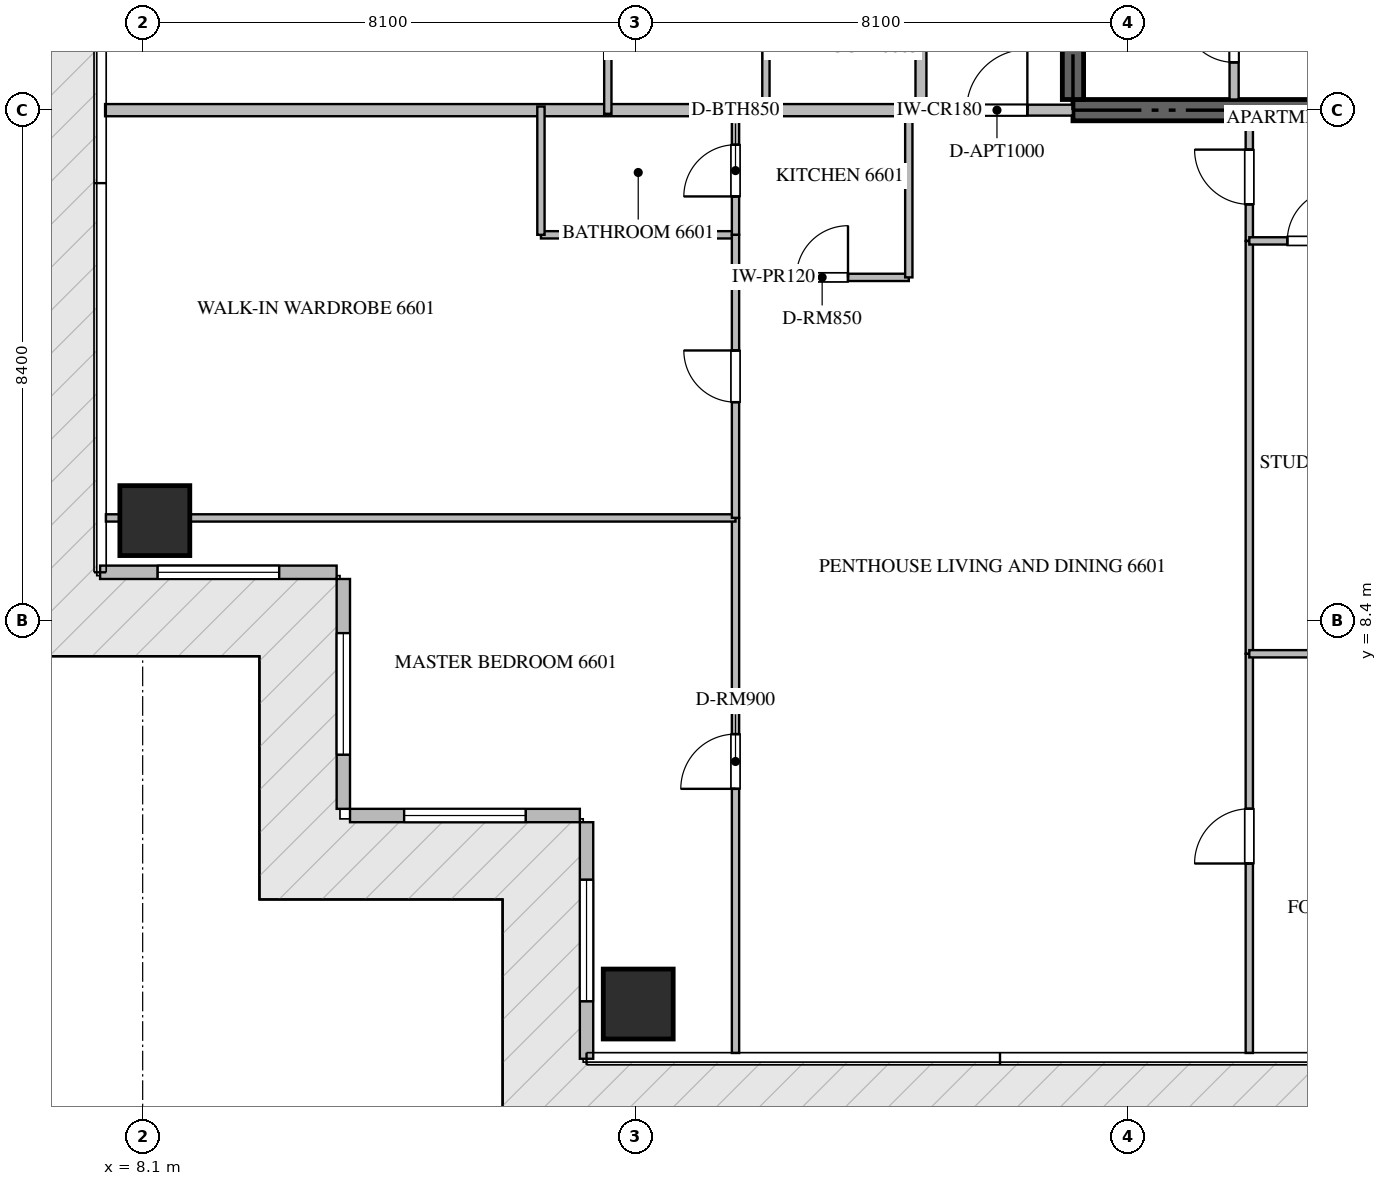
"""IFC4 building model, lengths in metres.
Left out: names, types, materials, properties, quantities, classifications, styles, units other than length and angle.
Written with IfcOpenShell. Run it as: python <this file> out.ifc"""

import sys

from ifc_helpers import new_model, si_unit, direction, frame, frame_2d, origin, origin_2d, place, context, subcontext, project, spatial, rectangle, extrude, source, transform, mapped, element, fill, save


model = new_model("IFC4")
c1 = context("Model", 3, precision=1e-05, world=origin(), true_north=direction((0.0, 1.0)))
c2 = subcontext(c1, "Body", "Model", "MODEL_VIEW")
j1 = project(units=[si_unit("LENGTHUNIT", "METRE"), si_unit("PLANEANGLEUNIT", "RADIAN")], contexts=[c1])
p1 = place(None, origin())
s1 = spatial("IfcSite", under=j1, at=p1, CompositionType="ELEMENT")
p2 = place(p1, origin())
s2 = spatial("IfcBuilding", under=s1, at=p2, CompositionType="ELEMENT")
p3 = place(p2, frame((0.0, 0.0, 264.35)))
s3 = spatial("IfcBuildingStorey", under=s2, at=p3, CompositionType="ELEMENT", Elevation=264.35)
p4 = place(p3, frame((23.4, 16.8, -0.26), z_axis=(0.0, 0.0, 1.0), x_axis=(1.0, 0.0, 0.0)))
e1 = element("IfcWall", 1, at=p4, inside=s3, PredefinedType="SHEAR", context=c2, shape_type="SweptSolid", body=[
    extrude(rectangle(XDim=18.0, YDim=0.35, at=frame_2d((9.0, 0.0))), origin(), (0.0, 0.0, 1.0), 3.848),
])
p5 = place(p3, frame((23.4, 16.975, -0.26), z_axis=(0.0, 0.0, 1.0), x_axis=(0.0, 1.0, 0.0)))
e2 = element("IfcWall", 2, at=p5, inside=s3, PredefinedType="SHEAR", context=c2, shape_type="SweptSolid", body=[
    extrude(rectangle(XDim=4.875, YDim=0.35, at=frame_2d((2.438, 0.0))), origin(), (0.0, 0.0, 1.0), 3.848),
])
m1 = source(origin(), c2, "Body", "SweptSolid", [
    extrude(rectangle(XDim=1.15, YDim=1.15, at=origin_2d()), origin(), (0.0, 0.0, 1.0), 3.85),
])
for number, where, z_axis, x_axis in (
    (3, (16.25, 2.1, -0.26), (0.0, 0.0, 1.0), (1.0, 0.0, 0.0)),
    (4, (8.3, 10.05, -0.26), (0.0, 0.0, 1.0), (1.0, 0.0, 0.0)),
):
    element("IfcColumn", number, at=place(p3, frame(where, z_axis=z_axis, x_axis=x_axis)), inside=s3, PredefinedType="COLUMN", context=c2, shape_type="MappedRepresentation", body=[
        mapped(m1, transform((0.0, 0.0, 0.0), scale=1.0)),
    ])
p6 = place(p3, frame((7.4, 9.2, 0.0), z_axis=(0.0, 0.0, 1.0), x_axis=(1.0, 0.0, 0.0)))
e5 = element("IfcWall", 5, at=p6, inside=s3, PredefinedType="ELEMENTEDWALL", context=c2, shape_type="SweptSolid", body=[
    extrude(rectangle(XDim=3.89, YDim=0.22, at=frame_2d((1.945, 0.0))), origin(), (0.0, 0.0, 1.0), 3.575),
])
p7 = place(p6, frame((0.945, 0.0, 0.65)))
e6 = element("IfcOpeningElement", 6, at=p7, cuts=e5, PredefinedType="OPENING", context=c2, shape_type="SweptSolid", body=[
    extrude(rectangle(XDim=2.0, YDim=2.2, at=frame_2d((1.0, 1.1))), frame((0.0, 0.12, 0.0), z_axis=(0.0, -1.0, 0.0), x_axis=(1.0, 0.0, 0.0)), (0.0, 0.0, 1.0), 0.24),
])
p8 = place(p3, frame((11.4, 9.09, 0.0), z_axis=(0.0, 0.0, 1.0), x_axis=(0.0, -1.0, 0.0)))
e7 = element("IfcWall", 7, at=p8, inside=s3, PredefinedType="ELEMENTEDWALL", context=c2, shape_type="SweptSolid", body=[
    extrude(rectangle(XDim=3.78, YDim=0.22, at=frame_2d((1.89, 0.0))), origin(), (0.0, 0.0, 1.0), 3.575),
])
p9 = place(p8, frame((0.89, 0.0, 0.65)))
e8 = element("IfcOpeningElement", 8, at=p9, cuts=e7, PredefinedType="OPENING", context=c2, shape_type="SweptSolid", body=[
    extrude(rectangle(XDim=2.0, YDim=2.2, at=frame_2d((1.0, 1.1))), frame((0.0, 0.12, 0.0), z_axis=(0.0, -1.0, 0.0), x_axis=(1.0, 0.0, 0.0)), (0.0, 0.0, 1.0), 0.24),
])
p10 = place(p3, frame((11.51, 5.2, 0.0), z_axis=(0.0, 0.0, 1.0), x_axis=(1.0, 0.0, 0.0)))
e9 = element("IfcWall", 9, at=p10, inside=s3, PredefinedType="ELEMENTEDWALL", context=c2, shape_type="SweptSolid", body=[
    extrude(rectangle(XDim=3.78, YDim=0.22, at=frame_2d((1.89, 0.0))), origin(), (0.0, 0.0, 1.0), 3.575),
])
p11 = place(p10, frame((0.89, 0.0, 0.65)))
e10 = element("IfcOpeningElement", 10, at=p11, cuts=e9, PredefinedType="OPENING", context=c2, shape_type="SweptSolid", body=[
    extrude(rectangle(XDim=2.0, YDim=2.2, at=frame_2d((1.0, 1.1))), frame((0.0, 0.12, 0.0), z_axis=(0.0, -1.0, 0.0), x_axis=(1.0, 0.0, 0.0)), (0.0, 0.0, 1.0), 0.24),
])
p12 = place(p3, frame((15.4, 5.09, 0.0), z_axis=(0.0, 0.0, 1.0), x_axis=(0.0, -1.0, 0.0)))
e11 = element("IfcWall", 11, at=p12, inside=s3, PredefinedType="ELEMENTEDWALL", context=c2, shape_type="SweptSolid", body=[
    extrude(rectangle(XDim=3.89, YDim=0.22, at=frame_2d((1.945, 0.0))), origin(), (0.0, 0.0, 1.0), 3.575),
])
p13 = place(p12, frame((0.945, 0.0, 0.65)))
e12 = element("IfcOpeningElement", 12, at=p13, cuts=e11, PredefinedType="OPENING", context=c2, shape_type="SweptSolid", body=[
    extrude(rectangle(XDim=2.0, YDim=2.2, at=frame_2d((1.0, 1.1))), frame((0.0, 0.12, 0.0), z_axis=(0.0, -1.0, 0.0), x_axis=(1.0, 0.0, 0.0)), (0.0, 0.0, 1.0), 0.24),
])
p14 = place(p3, frame((26.05, 16.975, 0.0), z_axis=(0.0, 0.0, 1.0), x_axis=(0.0, 1.0, 0.0)))
e13 = element("IfcWall", 13, at=p14, inside=s3, PredefinedType="PARTITIONING", context=c2, shape_type="SweptSolid", body=[
    extrude(rectangle(XDim=2.073, YDim=0.15, at=frame_2d((1.037, 0.0))), origin(), (0.0, 0.0, 1.0), 3.59),
])
p15 = place(p14, frame((0.611, 0.0, 0.0)))
e14 = element("IfcOpeningElement", 14, at=p15, cuts=e13, PredefinedType="OPENING", context=c2, shape_type="SweptSolid", body=[
    extrude(rectangle(XDim=0.85, YDim=2.1, at=frame_2d((0.425, 1.05))), frame((0.0, 0.085, 0.0), z_axis=(0.0, -1.0, 0.0), x_axis=(1.0, 0.0, 0.0)), (0.0, 0.0, 1.0), 0.17),
])
p16 = place(p3, frame((7.482, 16.8, 0.0), z_axis=(0.0, 0.0, 1.0), x_axis=(1.0, 0.0, 0.0)))
e15 = element("IfcWall", 15, at=p16, inside=s3, PredefinedType="PARTITIONING", context=c2, shape_type="SweptSolid", body=[
    extrude(rectangle(XDim=13.418, YDim=0.2, at=frame_2d((6.709, 0.0))), origin(), (0.0, 0.0, 1.0), 3.59),
])
p17 = place(p3, frame((20.902, 16.8, 0.0), z_axis=(0.0, 0.0, 1.0), x_axis=(1.0, 0.0, 0.0)))
e16 = element("IfcWall", 16, at=p17, inside=s3, PredefinedType="PARTITIONING", context=c2, shape_type="SweptSolid", body=[
    extrude(rectangle(XDim=2.496, YDim=0.18, at=frame_2d((1.248, 0.0))), origin(), (0.0, 0.0, 1.0), 3.59),
])
p18 = place(p17, frame((0.748, 0.0, 0.0)))
e17 = element("IfcOpeningElement", 17, at=p18, cuts=e16, PredefinedType="OPENING", context=c2, shape_type="SweptSolid", body=[
    extrude(rectangle(XDim=1.0, YDim=2.15, at=frame_2d((0.5, 1.075))), frame((0.0, 0.1, 0.0), z_axis=(0.0, -1.0, 0.0), x_axis=(1.0, 0.0, 0.0)), (0.0, 0.0, 1.0), 0.2),
])
p19 = place(p3, frame((20.9, 16.8, 0.0), z_axis=(0.0, 0.0, 1.0), x_axis=(0.0, 1.0, 0.0)))
e18 = element("IfcWall", 18, at=p19, inside=s3, PredefinedType="PARTITIONING", context=c2, shape_type="SweptSolid", body=[
    extrude(rectangle(XDim=16.8, YDim=0.18, at=frame_2d((8.4, 0.0))), origin(), (0.0, 0.0, 1.0), 3.59),
])
p20 = place(p19, frame((4.993, 0.0, 0.0)))
e19 = element("IfcOpeningElement", 19, at=p20, cuts=e18, PredefinedType="OPENING", context=c2, shape_type="SweptSolid", body=[
    extrude(rectangle(XDim=1.0, YDim=2.15, at=frame_2d((0.5, 1.075))), frame((0.0, 0.1, 0.0), z_axis=(0.0, -1.0, 0.0), x_axis=(1.0, 0.0, 0.0)), (0.0, 0.0, 1.0), 0.2),
])
p21 = place(p19, frame((13.351, 0.0, 0.0)))
e20 = element("IfcOpeningElement", 20, at=p21, cuts=e18, PredefinedType="OPENING", context=c2, shape_type="SweptSolid", body=[
    extrude(rectangle(XDim=1.0, YDim=2.15, at=frame_2d((0.5, 1.075))), frame((0.0, 0.1, 0.0), z_axis=(0.0, -1.0, 0.0), x_axis=(1.0, 0.0, 0.0)), (0.0, 0.0, 1.0), 0.2),
])
p22 = place(p3, frame((17.85, 14.05, 0.0), z_axis=(0.0, 0.0, 1.0), x_axis=(1.0, 0.0, 0.0)))
e21 = element("IfcWall", 21, at=p22, inside=s3, PredefinedType="PARTITIONING", context=c2, shape_type="SweptSolid", body=[
    extrude(rectangle(XDim=2.85, YDim=0.12, at=frame_2d((1.425, 0.0))), origin(), (0.0, 0.0, 1.0), 3.59),
])
p23 = place(p22, frame((1.0, 0.0, 0.0)))
e22 = element("IfcOpeningElement", 22, at=p23, cuts=e21, PredefinedType="OPENING", context=c2, shape_type="SweptSolid", body=[
    extrude(rectangle(XDim=0.85, YDim=2.1, at=frame_2d((0.425, 1.05))), frame((0.0, 0.07, 0.0), z_axis=(0.0, -1.0, 0.0), x_axis=(1.0, 0.0, 0.0)), (0.0, 0.0, 1.0), 0.14),
])
p24 = place(p3, frame((20.7, 14.05, 0.0), z_axis=(0.0, 0.0, 1.0), x_axis=(0.0, 1.0, 0.0)))
e23 = element("IfcWall", 23, at=p24, inside=s3, PredefinedType="PARTITIONING", context=c2, shape_type="SweptSolid", body=[
    extrude(rectangle(XDim=2.81, YDim=0.12, at=frame_2d((1.405, 0.0))), origin(), (0.0, 0.0, 1.0), 3.59),
])
p25 = place(p3, frame((17.85, 1.295, 0.0), z_axis=(0.0, 0.0, 1.0), x_axis=(0.0, 1.0, 0.0)))
e24 = element("IfcWall", 24, at=p25, inside=s3, PredefinedType="PARTITIONING", context=c2, shape_type="SweptSolid", body=[
    extrude(rectangle(XDim=8.799, YDim=0.12, at=frame_2d((4.399, 0.0))), origin(), (0.0, 0.0, 1.0), 3.59),
])
p26 = place(p25, frame((4.344, 0.0, 0.0)))
e25 = element("IfcOpeningElement", 25, at=p26, cuts=e24, PredefinedType="OPENING", context=c2, shape_type="SweptSolid", body=[
    extrude(rectangle(XDim=0.9, YDim=2.1, at=frame_2d((0.45, 1.05))), frame((0.0, 0.07, 0.0), z_axis=(0.0, -1.0, 0.0), x_axis=(1.0, 0.0, 0.0)), (0.0, 0.0, 1.0), 0.14),
])
p27 = place(p3, frame((7.495, 10.094, 0.0), z_axis=(0.0, 0.0, 1.0), x_axis=(1.0, 0.0, 0.0)))
e26 = element("IfcWall", 26, at=p27, inside=s3, PredefinedType="PARTITIONING", context=c2, shape_type="SweptSolid", body=[
    extrude(rectangle(XDim=10.355, YDim=0.12, at=frame_2d((5.177, 0.0))), origin(), (0.0, 0.0, 1.0), 3.122),
])
p28 = place(p3, frame((14.65, 14.75, 0.0), z_axis=(0.0, 0.0, 1.0), x_axis=(1.0, 0.0, 0.0)))
e27 = element("IfcWall", 27, at=p28, inside=s3, PredefinedType="PARTITIONING", context=c2, shape_type="SweptSolid", body=[
    extrude(rectangle(XDim=3.2, YDim=0.12, at=frame_2d((1.6, 0.0))), origin(), (0.0, 0.0, 1.0), 3.59),
])
p29 = place(p3, frame((14.65, 14.75, 0.0), z_axis=(0.0, 0.0, 1.0), x_axis=(0.0, 1.0, 0.0)))
e28 = element("IfcWall", 28, at=p29, inside=s3, PredefinedType="PARTITIONING", context=c2, shape_type="SweptSolid", body=[
    extrude(rectangle(XDim=2.11, YDim=0.12, at=frame_2d((1.055, 0.0))), origin(), (0.0, 0.0, 1.0), 3.59),
])
p30 = place(p3, frame((17.85, 10.096, 0.0), z_axis=(0.0, 0.0, 1.0), x_axis=(0.0, 1.0, 0.0)))
e29 = element("IfcWall", 29, at=p30, inside=s3, PredefinedType="PARTITIONING", context=c2, shape_type="SweptSolid", body=[
    extrude(rectangle(XDim=4.654, YDim=0.12, at=frame_2d((2.327, 0.0))), origin(), (0.0, 0.0, 1.0), 3.59),
])
p31 = place(p30, frame((1.902, 0.0, 0.0)))
e30 = element("IfcOpeningElement", 30, at=p31, cuts=e29, PredefinedType="OPENING", context=c2, shape_type="SweptSolid", body=[
    extrude(rectangle(XDim=0.85, YDim=2.1, at=frame_2d((0.425, 1.05))), frame((0.0, 0.07, 0.0), z_axis=(0.0, -1.0, 0.0), x_axis=(1.0, 0.0, 0.0)), (0.0, 0.0, 1.0), 0.14),
])
p32 = place(p3, frame((17.85, 14.752, 0.0), z_axis=(0.0, 0.0, 1.0), x_axis=(0.0, 1.0, 0.0)))
e31 = element("IfcWall", 31, at=p32, inside=s3, PredefinedType="PARTITIONING", context=c2, shape_type="SweptSolid", body=[
    extrude(rectangle(XDim=2.108, YDim=0.12, at=frame_2d((1.054, 0.0))), origin(), (0.0, 0.0, 1.0), 3.59),
])
p33 = place(p32, frame((0.629, 0.0, 0.0)))
e32 = element("IfcOpeningElement", 32, at=p33, cuts=e31, PredefinedType="OPENING", context=c2, shape_type="SweptSolid", body=[
    extrude(rectangle(XDim=0.85, YDim=2.1, at=frame_2d((0.425, 1.05))), frame((0.0, 0.07, 0.0), z_axis=(0.0, -1.0, 0.0), x_axis=(1.0, 0.0, 0.0)), (0.0, 0.0, 1.0), 0.14),
])
p34 = place(p3, frame((26.3, 14.65, 0.0), z_axis=(0.0, 0.0, 1.0), x_axis=(0.0, 1.0, 0.0)))
e33 = element("IfcWall", 33, at=p34, inside=s3, PredefinedType="PARTITIONING", context=c2, shape_type="SweptSolid", body=[
    extrude(rectangle(XDim=1.975, YDim=0.12, at=frame_2d((0.988, 0.0))), origin(), (0.0, 0.0, 1.0), 3.59),
])
p35 = place(p34, frame((0.601, 0.0, 0.0)))
e34 = element("IfcOpeningElement", 34, at=p35, cuts=e33, PredefinedType="OPENING", context=c2, shape_type="SweptSolid", body=[
    extrude(rectangle(XDim=0.9, YDim=2.1, at=frame_2d((0.45, 1.05))), frame((0.0, 0.07, 0.0), z_axis=(0.0, -1.0, 0.0), x_axis=(1.0, 0.0, 0.0)), (0.0, 0.0, 1.0), 0.14),
])
p36 = place(p3, frame((26.3, 1.295, 0.0), z_axis=(0.0, 0.0, 1.0), x_axis=(0.0, 1.0, 0.0)))
e35 = element("IfcWall", 35, at=p36, inside=s3, PredefinedType="PARTITIONING", context=c2, shape_type="SweptSolid", body=[
    extrude(rectangle(XDim=6.565, YDim=0.12, at=frame_2d((3.283, 0.0))), origin(), (0.0, 0.0, 1.0), 3.59),
])
p37 = place(p36, frame((3.116, 0.0, 0.0)))
e36 = element("IfcOpeningElement", 36, at=p37, cuts=e35, PredefinedType="OPENING", context=c2, shape_type="SweptSolid", body=[
    extrude(rectangle(XDim=0.9, YDim=2.1, at=frame_2d((0.45, 1.05))), frame((0.0, 0.07, 0.0), z_axis=(0.0, -1.0, 0.0), x_axis=(1.0, 0.0, 0.0)), (0.0, 0.0, 1.0), 0.14),
])
p38 = place(p3, frame((26.3, 7.862, 0.0), z_axis=(0.0, 0.0, 1.0), x_axis=(0.0, 1.0, 0.0)))
e37 = element("IfcWall", 37, at=p38, inside=s3, PredefinedType="PARTITIONING", context=c2, shape_type="SweptSolid", body=[
    extrude(rectangle(XDim=6.786, YDim=0.12, at=frame_2d((3.393, 0.0))), origin(), (0.0, 0.0, 1.0), 3.59),
])
p39 = place(p3, frame((26.3, 7.86, 0.0), z_axis=(0.0, 0.0, 1.0), x_axis=(1.0, 0.0, 0.0)))
e38 = element("IfcWall", 38, at=p39, inside=s3, PredefinedType="PARTITIONING", context=c2, shape_type="SweptSolid", body=[
    extrude(rectangle(XDim=5.15, YDim=0.12, at=frame_2d((2.575, 0.0))), origin(), (0.0, 0.0, 1.0), 3.59),
])
p40 = place(p3, frame((26.3, 14.65, 0.0), z_axis=(0.0, 0.0, 1.0), x_axis=(1.0, 0.0, 0.0)))
e39 = element("IfcWall", 39, at=p40, inside=s3, PredefinedType="PARTITIONING", context=c2, shape_type="SweptSolid", body=[
    extrude(rectangle(XDim=2.1, YDim=0.12, at=frame_2d((1.05, 0.0))), origin(), (0.0, 0.0, 1.0), 3.59),
])
p41 = place(p40, frame((0.625, 0.0, 0.0)))
e40 = element("IfcOpeningElement", 40, at=p41, cuts=e39, PredefinedType="OPENING", context=c2, shape_type="SweptSolid", body=[
    extrude(rectangle(XDim=0.85, YDim=2.1, at=frame_2d((0.425, 1.05))), frame((0.0, 0.07, 0.0), z_axis=(0.0, -1.0, 0.0), x_axis=(1.0, 0.0, 0.0)), (0.0, 0.0, 1.0), 0.14),
])
for number, where, z_axis, x_axis in (
    (41, (18.35, 16.74, 0.0), (0.0, 0.0, 1.0), (0.0, 1.0, 0.0)),
    (42, (15.75, 16.74, 0.0), (0.0, 0.0, 1.0), (0.0, 1.0, 0.0)),
):
    element("IfcWall", number, at=place(p3, frame(where, z_axis=z_axis, x_axis=x_axis)), inside=s3, PredefinedType="PARTITIONING", context=c2, shape_type="SweptSolid", body=[
        extrude(rectangle(XDim=2.66, YDim=0.12, at=frame_2d((1.33, 0.0))), origin(), (0.0, 0.0, 1.0), 3.59),
    ])
m2 = source(origin(), c2, "Body", "SweptSolid", [
    extrude(rectangle(XDim=2.0, YDim=2.2, at=frame_2d((1.0, 1.1))), frame((0.0, 0.03, 0.0), z_axis=(0.0, -1.0, 0.0), x_axis=(1.0, 0.0, 0.0)), (0.0, 0.0, 1.0), 0.06),
])
p42 = place(p7, origin())
e43 = element("IfcWindow", 43, at=p42, inside=s3, PartitioningType="SINGLE_PANEL", PredefinedType="WINDOW", context=c2, shape_type="MappedRepresentation", body=[
    mapped(m2, transform((0.0, 0.0, 0.0), scale=1.0)),
])
fill(e6, e43)
p43 = place(p9, origin())
e44 = element("IfcWindow", 44, at=p43, inside=s3, PartitioningType="SINGLE_PANEL", PredefinedType="WINDOW", context=c2, shape_type="MappedRepresentation", body=[
    mapped(m2, transform((0.0, 0.0, 0.0), scale=1.0)),
])
fill(e8, e44)
p44 = place(p11, origin())
e45 = element("IfcWindow", 45, at=p44, inside=s3, PartitioningType="SINGLE_PANEL", PredefinedType="WINDOW", context=c2, shape_type="MappedRepresentation", body=[
    mapped(m2, transform((0.0, 0.0, 0.0), scale=1.0)),
])
fill(e10, e45)
p45 = place(p13, origin())
e46 = element("IfcWindow", 46, at=p45, inside=s3, PartitioningType="SINGLE_PANEL", PredefinedType="WINDOW", context=c2, shape_type="MappedRepresentation", body=[
    mapped(m2, transform((0.0, 0.0, 0.0), scale=1.0)),
])
fill(e12, e46)
m3 = source(origin(), c2, "Body", "SweptSolid", [
    extrude(rectangle(XDim=0.85, YDim=2.1, at=frame_2d((0.425, 1.05))), frame((0.0, 0.025, 0.0), z_axis=(0.0, -1.0, 0.0), x_axis=(1.0, 0.0, 0.0)), (0.0, 0.0, 1.0), 0.05),
])
p46 = place(p15, origin())
e47 = element("IfcDoor", 47, at=p46, inside=s3, OperationType="SINGLE_SWING_RIGHT", PredefinedType="DOOR", context=c2, shape_type="MappedRepresentation", body=[
    mapped(m3, transform((0.0, 0.0, 0.0), scale=1.0)),
])
fill(e14, e47)
m4 = source(origin(), c2, "Body", "SweptSolid", [
    extrude(rectangle(XDim=1.0, YDim=2.15, at=frame_2d((0.5, 1.075))), frame((0.0, 0.025, 0.0), z_axis=(0.0, -1.0, 0.0), x_axis=(1.0, 0.0, 0.0)), (0.0, 0.0, 1.0), 0.05),
])
p47 = place(p18, origin())
e48 = element("IfcDoor", 48, at=p47, inside=s3, OperationType="SINGLE_SWING_RIGHT", PredefinedType="DOOR", context=c2, shape_type="MappedRepresentation", body=[
    mapped(m4, transform((0.0, 0.0, 0.0), scale=1.0)),
])
fill(e17, e48)
p48 = place(p23, origin())
e49 = element("IfcDoor", 49, at=p48, inside=s3, OperationType="SINGLE_SWING_RIGHT", PredefinedType="DOOR", context=c2, shape_type="MappedRepresentation", body=[
    mapped(m3, transform((0.0, 0.0, 0.0), scale=1.0)),
])
fill(e22, e49)
m5 = source(origin(), c2, "Body", "SweptSolid", [
    extrude(rectangle(XDim=0.9, YDim=2.1, at=frame_2d((0.45, 1.05))), frame((0.0, 0.025, 0.0), z_axis=(0.0, -1.0, 0.0), x_axis=(1.0, 0.0, 0.0)), (0.0, 0.0, 1.0), 0.05),
])
p49 = place(p26, origin())
e50 = element("IfcDoor", 50, at=p49, inside=s3, OperationType="SINGLE_SWING_LEFT", PredefinedType="DOOR", context=c2, shape_type="MappedRepresentation", body=[
    mapped(m5, transform((0.0, 0.0, 0.0), scale=1.0)),
])
fill(e25, e50)
p50 = place(p31, origin())
e51 = element("IfcDoor", 51, at=p50, inside=s3, OperationType="SINGLE_SWING_RIGHT", PredefinedType="DOOR", context=c2, shape_type="MappedRepresentation", body=[
    mapped(m3, transform((0.0, 0.0, 0.0), scale=1.0)),
])
fill(e30, e51)
p51 = place(p33, origin())
e52 = element("IfcDoor", 52, at=p51, inside=s3, OperationType="SINGLE_SWING_LEFT", PredefinedType="DOOR", context=c2, shape_type="MappedRepresentation", body=[
    mapped(m3, transform((0.0, 0.0, 0.0), scale=1.0)),
])
fill(e32, e52)
p52 = place(p35, origin())
e53 = element("IfcDoor", 53, at=p52, inside=s3, OperationType="SINGLE_SWING_RIGHT", PredefinedType="DOOR", context=c2, shape_type="MappedRepresentation", body=[
    mapped(m5, transform((0.0, 0.0, 0.0), scale=1.0)),
])
fill(e34, e53)
p53 = place(p37, origin())
e54 = element("IfcDoor", 54, at=p53, inside=s3, OperationType="SINGLE_SWING_LEFT", PredefinedType="DOOR", context=c2, shape_type="MappedRepresentation", body=[
    mapped(m5, transform((0.0, 0.0, 0.0), scale=1.0)),
])
fill(e36, e54)
p54 = place(p41, origin())
e55 = element("IfcDoor", 55, at=p54, inside=s3, OperationType="SINGLE_SWING_RIGHT", PredefinedType="DOOR", context=c2, shape_type="MappedRepresentation", body=[
    mapped(m3, transform((0.0, 0.0, 0.0), scale=1.0)),
])
fill(e40, e55)
save(model, sys.argv[1])
